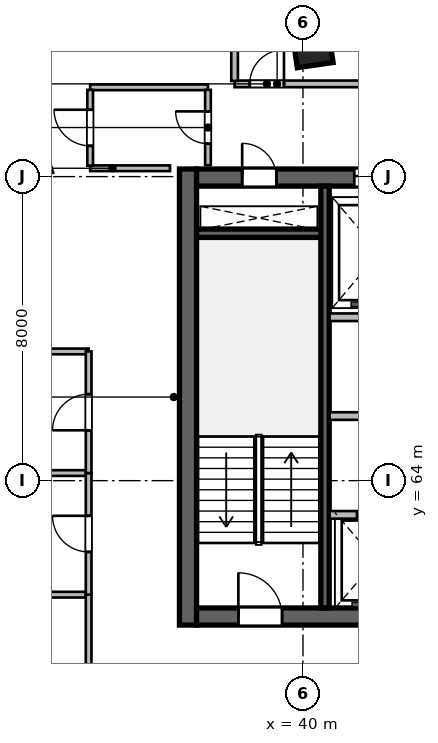
"""IFC4 building model, lengths in metres.
Left out: names, types, materials, properties, quantities, classifications, styles, units other than length and angle.
Written with IfcOpenShell. Run it as: python <this file> out.ifc"""

import sys

from ifc_helpers import new_model, si_unit, direction, frame, frame_2d, origin, origin_2d, place, context, subcontext, project, spatial, rectangle, extrude, source, transform, mapped, element, fill, save


model = new_model("IFC4")
c1 = context("Model", 3, precision=1e-05, world=origin(), true_north=direction((0.0, 1.0)))
c2 = subcontext(c1, "Body", "Model", "MODEL_VIEW")
j1 = project(units=[si_unit("LENGTHUNIT", "METRE"), si_unit("PLANEANGLEUNIT", "RADIAN")], contexts=[c1])
p1 = place(None, origin())
s1 = spatial("IfcSite", under=j1, at=p1, CompositionType="ELEMENT")
p2 = place(p1, origin())
s2 = spatial("IfcBuilding", under=s1, at=p2, CompositionType="ELEMENT")
p3 = place(p2, frame((0.0, 0.0, 239.1)))
s3 = spatial("IfcBuildingStorey", under=s2, at=p3, CompositionType="ELEMENT", Elevation=239.1)
m1 = source(origin(), c2, "Body", "SweptSolid", [
    extrude(rectangle(XDim=12.0, YDim=0.45, at=frame_2d((6.0, 0.0))), origin(), (0.0, 0.0, 1.0), 3.9),
])
p4 = place(p3, frame((36.975, 60.2, 0.0), z_axis=(0.0, 0.0, 1.0), x_axis=(0.0, 1.0, 0.0)))
e1 = element("IfcWall", 1, at=p4, inside=s3, PredefinedType="SHEAR", context=c2, shape_type="MappedRepresentation", body=[
    mapped(m1, transform((0.0, 0.0, 0.0), scale=1.0)),
])
m2 = source(origin(), c2, "Body", "SweptSolid", [
    extrude(rectangle(XDim=21.6, YDim=0.45, at=frame_2d((10.8, 0.0))), origin(), (0.0, 0.0, 1.0), 3.9),
])
p5 = place(p3, frame((37.2, 60.425, 0.0), z_axis=(0.0, 0.0, 1.0), x_axis=(1.0, 0.0, 0.0)))
e2 = element("IfcWall", 2, at=p5, inside=s3, PredefinedType="SHEAR", context=c2, shape_type="MappedRepresentation", body=[
    mapped(m2, transform((0.0, 0.0, 0.0), scale=1.0)),
])
p6 = place(p5, frame((1.1, 0.0, 0.0)))
e3 = element("IfcOpeningElement", 3, at=p6, cuts=e2, PredefinedType="OPENING", context=c2, shape_type="SweptSolid", body=[
    extrude(rectangle(XDim=1.15, YDim=2.15, at=frame_2d((0.575, 1.075))), frame((0.0, 0.235, 0.0), z_axis=(0.0, -1.0, 0.0), x_axis=(1.0, 0.0, 0.0)), (0.0, 0.0, 1.0), 0.47),
])
p7 = place(p5, frame((19.5, 0.0, 0.0)))
e4 = element("IfcOpeningElement", 4, at=p7, cuts=e2, PredefinedType="OPENING", context=c2, shape_type="SweptSolid", body=[
    extrude(rectangle(XDim=0.9, YDim=2.1, at=frame_2d((0.45, 1.05))), frame((0.0, 0.235, 0.0), z_axis=(0.0, -1.0, 0.0), x_axis=(1.0, 0.0, 0.0)), (0.0, 0.0, 1.0), 0.47),
])
p8 = place(p5, frame((12.02, 0.0, 0.0)))
e5 = element("IfcOpeningElement", 5, at=p8, cuts=e2, PredefinedType="OPENING", context=c2, shape_type="SweptSolid", body=[
    extrude(rectangle(XDim=1.6, YDim=2.15, at=frame_2d((0.8, 1.075))), frame((0.0, 0.235, 0.0), z_axis=(0.0, -1.0, 0.0), x_axis=(1.0, 0.0, 0.0)), (0.0, 0.0, 1.0), 0.47),
])
p9 = place(p3, frame((37.2, 71.975, 0.0), z_axis=(0.0, 0.0, 1.0), x_axis=(1.0, 0.0, 0.0)))
e6 = element("IfcWall", 6, at=p9, inside=s3, PredefinedType="SHEAR", context=c2, shape_type="MappedRepresentation", body=[
    mapped(m2, transform((0.0, 0.0, 0.0), scale=1.0)),
])
p10 = place(p9, frame((1.2, 0.0, 0.0)))
e7 = element("IfcOpeningElement", 7, at=p10, cuts=e6, PredefinedType="OPENING", context=c2, shape_type="SweptSolid", body=[
    extrude(rectangle(XDim=0.9, YDim=2.1, at=frame_2d((0.45, 1.05))), frame((0.0, 0.235, 0.0), z_axis=(0.0, -1.0, 0.0), x_axis=(1.0, 0.0, 0.0)), (0.0, 0.0, 1.0), 0.47),
])
p11 = place(p9, frame((14.7, 0.0, 0.0)))
e8 = element("IfcOpeningElement", 8, at=p11, cuts=e6, PredefinedType="OPENING", context=c2, shape_type="SweptSolid", body=[
    extrude(rectangle(XDim=1.2, YDim=2.15, at=frame_2d((0.6, 1.075))), frame((0.0, 0.235, 0.0), z_axis=(0.0, -1.0, 0.0), x_axis=(1.0, 0.0, 0.0)), (0.0, 0.0, 1.0), 0.47),
])
p12 = place(p9, frame((4.15, 0.0, 0.0)))
e9 = element("IfcOpeningElement", 9, at=p12, cuts=e6, PredefinedType="OPENING", context=c2, shape_type="SweptSolid", body=[
    extrude(rectangle(XDim=1.3, YDim=2.15, at=frame_2d((0.65, 1.075))), frame((0.0, 0.235, 0.0), z_axis=(0.0, -1.0, 0.0), x_axis=(1.0, 0.0, 0.0)), (0.0, 0.0, 1.0), 0.47),
])
p13 = place(p9, frame((6.76, 0.0, 0.0)))
e10 = element("IfcOpeningElement", 10, at=p13, cuts=e6, PredefinedType="OPENING", context=c2, shape_type="SweptSolid", body=[
    extrude(rectangle(XDim=0.85, YDim=2.1, at=frame_2d((0.425, 1.05))), frame((0.0, 0.235, 0.0), z_axis=(0.0, -1.0, 0.0), x_axis=(1.0, 0.0, 0.0)), (0.0, 0.0, 1.0), 0.47),
])
p14 = place(p9, frame((8.76, 0.0, 0.0)))
e11 = element("IfcOpeningElement", 11, at=p14, cuts=e6, PredefinedType="OPENING", context=c2, shape_type="SweptSolid", body=[
    extrude(rectangle(XDim=0.85, YDim=2.1, at=frame_2d((0.425, 1.05))), frame((0.0, 0.235, 0.0), z_axis=(0.0, -1.0, 0.0), x_axis=(1.0, 0.0, 0.0)), (0.0, 0.0, 1.0), 0.47),
])
p15 = place(p9, frame((10.725, 0.0, 0.0)))
e12 = element("IfcOpeningElement", 12, at=p15, cuts=e6, PredefinedType="OPENING", context=c2, shape_type="SweptSolid", body=[
    extrude(rectangle(XDim=0.85, YDim=2.1, at=frame_2d((0.425, 1.05))), frame((0.0, 0.235, 0.0), z_axis=(0.0, -1.0, 0.0), x_axis=(1.0, 0.0, 0.0)), (0.0, 0.0, 1.0), 0.47),
])
m3 = source(origin(), c2, "Body", "SweptSolid", [
    extrude(rectangle(XDim=3.27, YDim=0.22, at=frame_2d((1.635, 0.0))), origin(), (0.0, 0.0, 1.0), 3.9),
])
p16 = place(p3, frame((37.2, 70.51, 0.0), z_axis=(0.0, 0.0, 1.0), x_axis=(1.0, 0.0, 0.0)))
e13 = element("IfcWall", 13, at=p16, inside=s3, PredefinedType="SHEAR", context=c2, shape_type="MappedRepresentation", body=[
    mapped(m3, transform((0.0, 0.0, 0.0), scale=1.0)),
])
m4 = source(origin(), c2, "Body", "SweptSolid", [
    extrude(rectangle(XDim=11.1, YDim=0.22, at=frame_2d((5.55, 0.0))), origin(), (0.0, 0.0, 1.0), 3.9),
])
p17 = place(p3, frame((40.58, 60.65, 0.0), z_axis=(0.0, 0.0, 1.0), x_axis=(0.0, 1.0, 0.0)))
e14 = element("IfcWall", 14, at=p17, inside=s3, PredefinedType="SHEAR", context=c2, shape_type="MappedRepresentation", body=[
    mapped(m4, transform((0.0, 0.0, 0.0), scale=1.0)),
])
m5 = source(origin(), c2, "Body", "SweptSolid", [
    extrude(rectangle(XDim=0.95, YDim=0.95, at=origin_2d()), origin(), (0.0, 0.0, 1.0), 3.9),
])
p18 = place(p3, frame((40.253, 75.404, 0.0), z_axis=(0.0, 0.0, 1.0), x_axis=(-0.143492621991, 0.98965138682, 0.0)))
e15 = element("IfcColumn", 15, at=p18, inside=s3, PredefinedType="COLUMN", context=c2, shape_type="MappedRepresentation", body=[
    mapped(m5, transform((0.0, 0.0, 0.0), scale=1.0)),
])
m6 = source(origin(), c2, "Body", "SweptSolid", [
    extrude(rectangle(XDim=8.8, YDim=0.2, at=frame_2d((4.4, 0.0))), origin(), (0.0, 0.0, 1.0), 3.65),
])
p19 = place(p3, frame((40.7, 68.3, 0.0), z_axis=(0.0, 0.0, 1.0), x_axis=(1.0, 0.0, 0.0)))
e16 = element("IfcWall", 16, at=p19, inside=s3, PredefinedType="SOLIDWALL", context=c2, shape_type="MappedRepresentation", body=[
    mapped(m6, transform((0.0, 0.0, 0.0), scale=1.0)),
])
m7 = source(origin(), c2, "Body", "SweptSolid", [
    extrude(rectangle(XDim=8.02, YDim=0.2, at=frame_2d((4.01, 0.0))), origin(), (0.0, 0.0, 1.0), 3.65),
])
p20 = place(p3, frame((40.7, 63.1, 0.0), z_axis=(0.0, 0.0, 1.0), x_axis=(1.0, 0.0, 0.0)))
e17 = element("IfcWall", 17, at=p20, inside=s3, PredefinedType="SOLIDWALL", context=c2, shape_type="MappedRepresentation", body=[
    mapped(m7, transform((0.0, 0.0, 0.0), scale=1.0)),
])
p21 = place(p20, frame((0.72, 0.0, 0.0)))
e18 = element("IfcOpeningElement", 18, at=p21, cuts=e17, PredefinedType="OPENING", context=c2, shape_type="SweptSolid", body=[
    extrude(rectangle(XDim=1.0, YDim=2.15, at=frame_2d((0.5, 1.075))), frame((0.0, 0.11, 0.0), z_axis=(0.0, -1.0, 0.0), x_axis=(1.0, 0.0, 0.0)), (0.0, 0.0, 1.0), 0.22),
])
p22 = place(p20, frame((2.62, 0.0, 0.0)))
e19 = element("IfcOpeningElement", 19, at=p22, cuts=e17, PredefinedType="OPENING", context=c2, shape_type="SweptSolid", body=[
    extrude(rectangle(XDim=1.0, YDim=2.15, at=frame_2d((0.5, 1.075))), frame((0.0, 0.11, 0.0), z_axis=(0.0, -1.0, 0.0), x_axis=(1.0, 0.0, 0.0)), (0.0, 0.0, 1.0), 0.22),
])
p23 = place(p20, frame((4.55, 0.0, 0.0)))
e20 = element("IfcOpeningElement", 20, at=p23, cuts=e17, PredefinedType="OPENING", context=c2, shape_type="SweptSolid", body=[
    extrude(rectangle(XDim=1.0, YDim=2.15, at=frame_2d((0.5, 1.075))), frame((0.0, 0.11, 0.0), z_axis=(0.0, -1.0, 0.0), x_axis=(1.0, 0.0, 0.0)), (0.0, 0.0, 1.0), 0.22),
])
p24 = place(p20, frame((6.55, 0.0, 0.0)))
e21 = element("IfcOpeningElement", 21, at=p24, cuts=e17, PredefinedType="OPENING", context=c2, shape_type="SweptSolid", body=[
    extrude(rectangle(XDim=1.0, YDim=2.15, at=frame_2d((0.5, 1.075))), frame((0.0, 0.11, 0.0), z_axis=(0.0, -1.0, 0.0), x_axis=(1.0, 0.0, 0.0)), (0.0, 0.0, 1.0), 0.22),
])
p25 = place(p3, frame((40.7, 65.7, 0.0), z_axis=(0.0, 0.0, 1.0), x_axis=(1.0, 0.0, 0.0)))
e22 = element("IfcWall", 22, at=p25, inside=s3, PredefinedType="SOLIDWALL", context=c2, shape_type="MappedRepresentation", body=[
    mapped(m6, transform((0.0, 0.0, 0.0), scale=1.0)),
])
p26 = place(p25, frame((3.8, 0.0, 0.0)))
e23 = element("IfcOpeningElement", 23, at=p26, cuts=e22, PredefinedType="OPENING", context=c2, shape_type="SweptSolid", body=[
    extrude(rectangle(XDim=0.95, YDim=2.15, at=frame_2d((0.475, 1.075))), frame((0.0, 0.11, 0.0), z_axis=(0.0, -1.0, 0.0), x_axis=(1.0, 0.0, 0.0)), (0.0, 0.0, 1.0), 0.22),
])
m8 = source(origin(), c2, "Body", "SweptSolid", [
    extrude(rectangle(XDim=2.1, YDim=0.15, at=frame_2d((1.05, 0.0))), origin(), (0.0, 0.0, 1.0), 3.65),
])
p27 = place(p3, frame((34.4, 72.22, 0.0), z_axis=(0.0, 0.0, 1.0), x_axis=(1.0, 0.0, 0.0)))
e24 = element("IfcWall", 24, at=p27, inside=s3, PredefinedType="PARTITIONING", context=c2, shape_type="MappedRepresentation", body=[
    mapped(m8, transform((0.0, 0.0, 0.0), scale=1.0)),
])
m9 = source(origin(), c2, "Body", "SweptSolid", [
    extrude(rectangle(XDim=3.1, YDim=0.15, at=frame_2d((1.55, 0.0))), origin(), (0.0, 0.0, 1.0), 3.081),
])
p28 = place(p3, frame((34.4, 74.35, 0.0), z_axis=(0.0, 0.0, 1.0), x_axis=(1.0, 0.0, 0.0)))
e25 = element("IfcWall", 25, at=p28, inside=s3, PredefinedType="PARTITIONING", context=c2, shape_type="MappedRepresentation", body=[
    mapped(m9, transform((0.0, 0.0, 0.0), scale=1.0)),
])
m10 = source(origin(), c2, "Body", "SweptSolid", [
    extrude(rectangle(XDim=1.995, YDim=0.15, at=frame_2d((0.998, 0.0))), origin(), (0.0, 0.0, 1.0), 3.65),
])
p29 = place(p3, frame((34.4, 72.288, 0.0), z_axis=(0.0, 0.0, 1.0), x_axis=(0.0, 1.0, 0.0)))
e26 = element("IfcWall", 26, at=p29, inside=s3, PredefinedType="PARTITIONING", context=c2, shape_type="MappedRepresentation", body=[
    mapped(m10, transform((0.0, 0.0, 0.0), scale=1.0)),
])
p30 = place(p29, frame((0.522, 0.0, 0.0)))
e27 = element("IfcOpeningElement", 27, at=p30, cuts=e26, PredefinedType="OPENING", context=c2, shape_type="SweptSolid", body=[
    extrude(rectangle(XDim=0.95, YDim=2.1, at=frame_2d((0.475, 1.05))), frame((0.0, 0.085, 0.0), z_axis=(0.0, -1.0, 0.0), x_axis=(1.0, 0.0, 0.0)), (0.0, 0.0, 1.0), 0.17),
])
m11 = source(origin(), c2, "Body", "SweptSolid", [
    extrude(rectangle(XDim=1.982, YDim=0.15, at=frame_2d((0.991, 0.0))), origin(), (0.0, 0.0, 1.0), 3.65),
])
p31 = place(p3, frame((37.5, 72.3, 0.0), z_axis=(0.0, 0.0, 1.0), x_axis=(0.0, 1.0, 0.0)))
e28 = element("IfcWall", 28, at=p31, inside=s3, PredefinedType="PARTITIONING", context=c2, shape_type="MappedRepresentation", body=[
    mapped(m11, transform((0.0, 0.0, 0.0), scale=1.0)),
])
p32 = place(p31, frame((0.566, 0.0, 0.0)))
e29 = element("IfcOpeningElement", 29, at=p32, cuts=e28, PredefinedType="OPENING", context=c2, shape_type="SweptSolid", body=[
    extrude(rectangle(XDim=0.85, YDim=2.1, at=frame_2d((0.425, 1.05))), frame((0.0, 0.085, 0.0), z_axis=(0.0, -1.0, 0.0), x_axis=(1.0, 0.0, 0.0)), (0.0, 0.0, 1.0), 0.17),
])
m12 = source(origin(), c2, "Body", "SweptSolid", [
    extrude(rectangle(XDim=4.0, YDim=0.175, at=frame_2d((2.0, 0.0))), origin(), (0.0, 0.0, 1.0), 3.65),
])
p33 = place(p3, frame((38.2, 74.44, 0.0), z_axis=(0.0, 0.0, 1.0), x_axis=(1.0, 0.0, 0.0)))
e30 = element("IfcWall", 30, at=p33, inside=s3, PredefinedType="PARTITIONING", context=c2, shape_type="MappedRepresentation", body=[
    mapped(m12, transform((0.0, 0.0, 0.0), scale=1.0)),
])
p34 = place(p33, frame((0.4, 0.0, 0.0)))
e31 = element("IfcOpeningElement", 31, at=p34, cuts=e30, PredefinedType="OPENING", context=c2, shape_type="SweptSolid", body=[
    extrude(rectangle(XDim=0.9, YDim=2.08, at=frame_2d((0.45, 1.04))), frame((0.0, 0.098, 0.0), z_axis=(0.0, -1.0, 0.0), x_axis=(1.0, 0.0, 0.0)), (0.0, 0.0, 1.0), 0.195),
])
m13 = source(origin(), c2, "Body", "SweptSolid", [
    extrude(rectangle(XDim=2.403, YDim=0.175, at=frame_2d((1.201, 0.0))), origin(), (0.0, 0.0, 1.0), 3.65),
])
p35 = place(p3, frame((38.2, 74.519, 0.0), z_axis=(0.0, 0.0, 1.0), x_axis=(0.0, 1.0, 0.0)))
e32 = element("IfcWall", 32, at=p35, inside=s3, PredefinedType="PARTITIONING", context=c2, shape_type="MappedRepresentation", body=[
    mapped(m13, transform((0.0, 0.0, 0.0), scale=1.0)),
])
m14 = source(origin(), c2, "Body", "SweptSolid", [
    extrude(rectangle(XDim=17.879, YDim=0.15, at=frame_2d((8.939, 0.0))), origin(), (0.0, 0.0, 1.0), 3.65),
])
p36 = place(p3, frame((16.481, 61.0, 0.0), z_axis=(0.0, 0.0, 1.0), x_axis=(1.0, 0.0, 0.0)))
e33 = element("IfcWall", 33, at=p36, inside=s3, PredefinedType="PARTITIONING", context=c2, shape_type="MappedRepresentation", body=[
    mapped(m14, transform((0.0, 0.0, 0.0), scale=1.0)),
])
m15 = source(origin(), c2, "Body", "SweptSolid", [
    extrude(rectangle(XDim=3.04, YDim=0.15, at=frame_2d((1.52, 0.0))), origin(), (0.0, 0.0, 1.0), 3.65),
])
p37 = place(p3, frame((34.36, 57.96, 0.0), z_axis=(0.0, 0.0, 1.0), x_axis=(0.0, 1.0, 0.0)))
e34 = element("IfcWall", 34, at=p37, inside=s3, PredefinedType="PARTITIONING", context=c2, shape_type="MappedRepresentation", body=[
    mapped(m15, transform((0.0, 0.0, 0.0), scale=1.0)),
])
m16 = source(origin(), c2, "Body", "SweptSolid", [
    extrude(rectangle(XDim=15.501, YDim=0.15, at=frame_2d((7.751, 0.0))), origin(), (0.0, 0.0, 1.0), 3.65),
])
p38 = place(p3, frame((18.859, 64.2, 0.0), z_axis=(0.0, 0.0, 1.0), x_axis=(1.0, 0.0, 0.0)))
e35 = element("IfcWall", 35, at=p38, inside=s3, PredefinedType="PARTITIONING", context=c2, shape_type="MappedRepresentation", body=[
    mapped(m16, transform((0.0, 0.0, 0.0), scale=1.0)),
])
m17 = source(origin(), c2, "Body", "SweptSolid", [
    extrude(rectangle(XDim=3.2, YDim=0.15, at=frame_2d((1.6, 0.0))), origin(), (0.0, 0.0, 1.0), 3.65),
])
p39 = place(p3, frame((34.36, 61.0, 0.0), z_axis=(0.0, 0.0, 1.0), x_axis=(0.0, 1.0, 0.0)))
e36 = element("IfcWall", 36, at=p39, inside=s3, PredefinedType="PARTITIONING", context=c2, shape_type="MappedRepresentation", body=[
    mapped(m17, transform((0.0, 0.0, 0.0), scale=1.0)),
])
p40 = place(p39, frame((1.125, 0.0, 0.0)))
e37 = element("IfcOpeningElement", 37, at=p40, cuts=e36, PredefinedType="OPENING", context=c2, shape_type="SweptSolid", body=[
    extrude(rectangle(XDim=0.95, YDim=2.1, at=frame_2d((0.475, 1.05))), frame((0.0, 0.085, 0.0), z_axis=(0.0, -1.0, 0.0), x_axis=(1.0, 0.0, 0.0)), (0.0, 0.0, 1.0), 0.17),
])
m18 = source(origin(), c2, "Body", "SweptSolid", [
    extrude(rectangle(XDim=12.688, YDim=0.15, at=frame_2d((6.344, 0.0))), origin(), (0.0, 0.0, 1.0), 3.65),
])
p41 = place(p3, frame((21.672, 67.4, 0.0), z_axis=(0.0, 0.0, 1.0), x_axis=(1.0, 0.0, 0.0)))
e38 = element("IfcWall", 38, at=p41, inside=s3, PredefinedType="PARTITIONING", context=c2, shape_type="MappedRepresentation", body=[
    mapped(m18, transform((0.0, 0.0, 0.0), scale=1.0)),
])
p42 = place(p3, frame((34.36, 64.2, 0.0), z_axis=(0.0, 0.0, 1.0), x_axis=(0.0, 1.0, 0.0)))
e39 = element("IfcWall", 39, at=p42, inside=s3, PredefinedType="PARTITIONING", context=c2, shape_type="MappedRepresentation", body=[
    mapped(m17, transform((0.0, 0.0, 0.0), scale=1.0)),
])
p43 = place(p42, frame((1.125, 0.0, 0.0)))
e40 = element("IfcOpeningElement", 40, at=p43, cuts=e39, PredefinedType="OPENING", context=c2, shape_type="SweptSolid", body=[
    extrude(rectangle(XDim=0.95, YDim=2.1, at=frame_2d((0.475, 1.05))), frame((0.0, 0.085, 0.0), z_axis=(0.0, -1.0, 0.0), x_axis=(1.0, 0.0, 0.0)), (0.0, 0.0, 1.0), 0.17),
])
m19 = source(origin(), c2, "Body", "SweptSolid", [
    extrude(rectangle(XDim=1.15, YDim=2.15, at=frame_2d((0.575, 1.075))), frame((0.0, 0.025, 0.0), z_axis=(0.0, -1.0, 0.0), x_axis=(1.0, 0.0, 0.0)), (0.0, 0.0, 1.0), 0.05),
])
p44 = place(p6, origin())
e41 = element("IfcDoor", 41, at=p44, inside=s3, OperationType="SINGLE_SWING_LEFT", PredefinedType="DOOR", context=c2, shape_type="MappedRepresentation", body=[
    mapped(m19, transform((0.0, 0.0, 0.0), scale=1.0)),
])
fill(e3, e41)
m20 = source(origin(), c2, "Body", "SweptSolid", [
    extrude(rectangle(XDim=0.9, YDim=2.1, at=frame_2d((0.45, 1.05))), frame((0.0, 0.025, 0.0), z_axis=(0.0, -1.0, 0.0), x_axis=(1.0, 0.0, 0.0)), (0.0, 0.0, 1.0), 0.05),
])
p45 = place(p10, origin())
e42 = element("IfcDoor", 42, at=p45, inside=s3, OperationType="SINGLE_SWING_LEFT", PredefinedType="DOOR", context=c2, shape_type="MappedRepresentation", body=[
    mapped(m20, transform((0.0, 0.0, 0.0), scale=1.0)),
])
fill(e7, e42)
m21 = source(origin(), c2, "Body", "SweptSolid", [
    extrude(rectangle(XDim=1.3, YDim=2.15, at=frame_2d((0.65, 1.075))), frame((0.0, 0.025, 0.0), z_axis=(0.0, -1.0, 0.0), x_axis=(1.0, 0.0, 0.0)), (0.0, 0.0, 1.0), 0.05),
])
p46 = place(p12, origin())
e43 = element("IfcDoor", 43, at=p46, inside=s3, OperationType="DOUBLE_DOOR_SLIDING", PredefinedType="DOOR", context=c2, shape_type="MappedRepresentation", body=[
    mapped(m21, transform((0.0, 0.0, 0.0), scale=1.0)),
])
fill(e9, e43)
m22 = source(origin(), c2, "Body", "SweptSolid", [
    extrude(rectangle(XDim=1.0, YDim=2.15, at=frame_2d((0.5, 1.075))), frame((0.0, 0.025, 0.0), z_axis=(0.0, -1.0, 0.0), x_axis=(1.0, 0.0, 0.0)), (0.0, 0.0, 1.0), 0.05),
])
p47 = place(p21, origin())
e44 = element("IfcDoor", 44, at=p47, inside=s3, OperationType="DOUBLE_DOOR_SLIDING", PredefinedType="DOOR", context=c2, shape_type="MappedRepresentation", body=[
    mapped(m22, transform((0.0, 0.0, 0.0), scale=1.0)),
])
fill(e18, e44)
m23 = source(origin(), c2, "Body", "SweptSolid", [
    extrude(rectangle(XDim=0.85, YDim=2.1, at=frame_2d((0.425, 1.05))), frame((0.0, 0.025, 0.0), z_axis=(0.0, -1.0, 0.0), x_axis=(1.0, 0.0, 0.0)), (0.0, 0.0, 1.0), 0.05),
])
p48 = place(p32, origin())
e45 = element("IfcDoor", 45, at=p48, inside=s3, OperationType="SINGLE_SWING_RIGHT", PredefinedType="DOOR", context=c2, shape_type="MappedRepresentation", body=[
    mapped(m23, transform((0.0, 0.0, 0.0), scale=1.0)),
])
fill(e29, e45)
m24 = source(origin(), c2, "Body", "SweptSolid", [
    extrude(rectangle(XDim=0.9, YDim=2.08, at=frame_2d((0.45, 1.04))), frame((0.0, 0.025, 0.0), z_axis=(0.0, -1.0, 0.0), x_axis=(1.0, 0.0, 0.0)), (0.0, 0.0, 1.0), 0.05),
])
p49 = place(p34, origin())
e46 = element("IfcDoor", 46, at=p49, inside=s3, OperationType="SINGLE_SWING_RIGHT", PredefinedType="DOOR", context=c2, shape_type="MappedRepresentation", body=[
    mapped(m24, transform((0.0, 0.0, 0.0), scale=1.0)),
])
fill(e31, e46)
m25 = source(origin(), c2, "Body", "SweptSolid", [
    extrude(rectangle(XDim=0.95, YDim=2.1, at=frame_2d((0.475, 1.05))), frame((0.0, 0.025, 0.0), z_axis=(0.0, -1.0, 0.0), x_axis=(1.0, 0.0, 0.0)), (0.0, 0.0, 1.0), 0.05),
])
p50 = place(p40, origin())
e47 = element("IfcDoor", 47, at=p50, inside=s3, OperationType="SINGLE_SWING_RIGHT", PredefinedType="DOOR", context=c2, shape_type="MappedRepresentation", body=[
    mapped(m25, transform((0.0, 0.0, 0.0), scale=1.0)),
])
fill(e37, e47)
p51 = place(p43, origin())
e48 = element("IfcDoor", 48, at=p51, inside=s3, OperationType="SINGLE_SWING_LEFT", PredefinedType="DOOR", context=c2, shape_type="MappedRepresentation", body=[
    mapped(m25, transform((0.0, 0.0, 0.0), scale=1.0)),
])
fill(e40, e48)
p52 = place(p30, origin())
e49 = element("IfcDoor", 49, at=p52, inside=s3, OperationType="SINGLE_SWING_RIGHT", PredefinedType="DOOR", context=c2, shape_type="MappedRepresentation", body=[
    mapped(m25, transform((0.0, 0.0, 0.0), scale=1.0)),
])
fill(e27, e49)
save(model, sys.argv[1])
